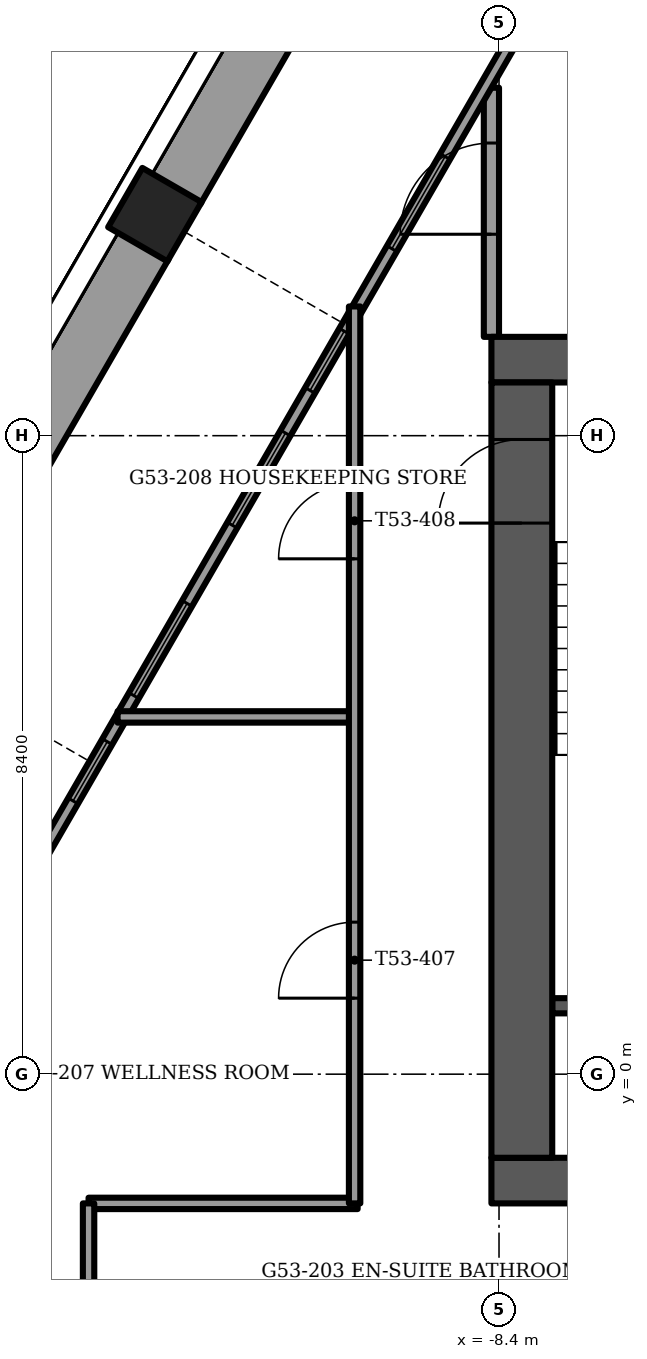
"""IFC4 building model, lengths in metres.
Left out: names, types, materials, properties, quantities, classifications, styles, units other than length and angle.
Written with IfcOpenShell. Run it as: python <this file> out.ifc"""

import sys

from ifc_helpers import new_model, si_unit, direction, frame, frame_2d, origin, origin_2d, place, context, subcontext, project, spatial, rectangle, extrude, element, fill, save


model = new_model("IFC4")
c1 = context("Model", 3, precision=1e-05, world=origin(), true_north=direction((0.0, 1.0)))
c2 = subcontext(c1, "Body", "Model", "MODEL_VIEW")
j1 = project(units=[si_unit("LENGTHUNIT", "METRE"), si_unit("PLANEANGLEUNIT", "RADIAN")], contexts=[c1])
p1 = place(None, origin())
s1 = spatial("IfcSite", under=j1, at=p1, CompositionType="ELEMENT")
p2 = place(p1, origin())
s2 = spatial("IfcBuilding", under=s1, at=p2, CompositionType="ELEMENT")
p3 = place(p2, frame((0.0, 0.0, 214.5)))
s3 = spatial("IfcBuildingStorey", under=s2, at=p3, CompositionType="ELEMENT", Elevation=214.5)
p4 = place(p3, frame((-12.928, 11.308, -1.2), z_axis=(0.0, 0.0, 1.0), x_axis=(0.5, 0.866025403784, 0.0)))
e1 = element("IfcColumn", 1, at=p4, inside=s3, PredefinedType="COLUMN", context=c2, shape_type="SweptSolid", body=[
    extrude(rectangle(XDim=0.9, YDim=0.9, at=origin_2d()), origin(), (0.0, 0.0, 1.0), 3.75),
])
p5 = place(p3, frame((-8.5, -1.4, -0.3), z_axis=(0.0, 0.0, 1.0), x_axis=(1.0, 0.0, 0.0)))
e2 = element("IfcWall", 2, at=p5, inside=s3, PredefinedType="SHEAR", context=c2, shape_type="SweptSolid", body=[
    extrude(rectangle(XDim=17.0, YDim=0.6, at=frame_2d((8.5, 0.0))), origin(), (0.0, 0.0, 1.0), 3.75),
])
p6 = place(p5, frame((7.7, 0.0, 0.0)))
e3 = element("IfcOpeningElement", 3, at=p6, cuts=e2, PredefinedType="OPENING", context=c2, shape_type="SweptSolid", body=[
    extrude(rectangle(XDim=1.6, YDim=2.1, at=frame_2d((0.8, 1.05))), frame((0.0, 0.3, 0.0), z_axis=(0.0, -1.0, 0.0), x_axis=(1.0, 0.0, 0.0)), (0.0, 0.0, 1.0), 0.6),
])
p7 = place(p3, frame((-8.5, 9.4, -0.3), z_axis=(0.0, 0.0, 1.0), x_axis=(1.0, 0.0, 0.0)))
e4 = element("IfcWall", 4, at=p7, inside=s3, PredefinedType="SHEAR", context=c2, shape_type="SweptSolid", body=[
    extrude(rectangle(XDim=17.0, YDim=0.6, at=frame_2d((8.5, 0.0))), origin(), (0.0, 0.0, 1.0), 3.75),
])
p8 = place(p7, frame((7.7, 0.0, 0.0)))
e5 = element("IfcOpeningElement", 5, at=p8, cuts=e4, PredefinedType="OPENING", context=c2, shape_type="SweptSolid", body=[
    extrude(rectangle(XDim=1.6, YDim=2.1, at=frame_2d((0.8, 1.05))), frame((0.0, 0.3, 0.0), z_axis=(0.0, -1.0, 0.0), x_axis=(1.0, 0.0, 0.0)), (0.0, 0.0, 1.0), 0.6),
])
p9 = place(p7, frame((1.75, 0.0, 0.0)))
e6 = element("IfcOpeningElement", 6, at=p9, cuts=e4, PredefinedType="OPENING", context=c2, shape_type="SweptSolid", body=[
    extrude(rectangle(XDim=1.1, YDim=2.1, at=frame_2d((0.55, 1.05))), frame((0.0, 0.3, 0.0), z_axis=(0.0, -1.0, 0.0), x_axis=(1.0, 0.0, 0.0)), (0.0, 0.0, 1.0), 0.6),
])
p10 = place(p7, frame((14.15, 0.0, 0.0)))
e7 = element("IfcOpeningElement", 7, at=p10, cuts=e4, PredefinedType="OPENING", context=c2, shape_type="SweptSolid", body=[
    extrude(rectangle(XDim=1.1, YDim=2.1, at=frame_2d((0.55, 1.05))), frame((0.0, 0.3, 0.0), z_axis=(0.0, -1.0, 0.0), x_axis=(1.0, 0.0, 0.0)), (0.0, 0.0, 1.0), 0.6),
])
p11 = place(p3, frame((-8.1, -1.1, -0.3), z_axis=(0.0, 0.0, 1.0), x_axis=(0.0, 1.0, 0.0)))
e8 = element("IfcWall", 8, at=p11, inside=s3, PredefinedType="SHEAR", context=c2, shape_type="SweptSolid", body=[
    extrude(rectangle(XDim=10.2, YDim=0.8, at=frame_2d((5.1, 0.0))), origin(), (0.0, 0.0, 1.0), 3.75),
])
p12 = place(p11, frame((8.35, 0.0, 0.0)))
e9 = element("IfcOpeningElement", 9, at=p12, cuts=e8, PredefinedType="OPENING", context=c2, shape_type="SweptSolid", body=[
    extrude(rectangle(XDim=1.1, YDim=2.1, at=frame_2d((0.55, 1.05))), frame((0.0, 0.4, 0.0), z_axis=(0.0, -1.0, 0.0), x_axis=(1.0, 0.0, 0.0)), (0.0, 0.0, 1.0), 0.8),
])
p13 = place(p3, frame((-9.972, 16.428, 0.0), z_axis=(0.0, 0.0, 1.0), x_axis=(-0.50000722722, -0.866021231107, 0.0)))
e10 = element("IfcWall", 10, at=p13, inside=s3, PredefinedType="PARAPET", context=c2, shape_type="SweptSolid", body=[
    extrude(rectangle(XDim=5.492, YDim=0.9, at=frame_2d((2.746, 0.0))), origin(), (0.0, 0.0, 1.0), 1.1),
])
p14 = place(p3, frame((-13.138, 10.945, 0.0), z_axis=(0.0, 0.0, 1.0), x_axis=(-0.500015433515, -0.866016493057, 0.0)))
e11 = element("IfcWall", 11, at=p14, inside=s3, PredefinedType="PARAPET", context=c2, shape_type="SweptSolid", body=[
    extrude(rectangle(XDim=5.819, YDim=0.9, at=frame_2d((2.909, 0.0))), origin(), (0.0, 0.0, 1.0), 1.1),
])
p15 = place(p3, frame((-6.961, 15.792, 0.0), z_axis=(0.0, 0.0, 1.0), x_axis=(-0.49999710518, -0.866027075103, 0.0)))
e12 = element("IfcWall", 12, at=p15, inside=s3, PredefinedType="SOLIDWALL", context=c2, shape_type="SweptSolid", body=[
    extrude(rectangle(XDim=17.621, YDim=0.15, at=frame_2d((8.81, 0.0))), origin(), (0.0, 0.0, 1.0), 3.45),
])
p16 = place(p15, frame((4.296, 0.0, 0.15)))
e13 = element("IfcOpeningElement", 13, at=p16, cuts=e12, PredefinedType="OPENING", context=c2, shape_type="SweptSolid", body=[
    extrude(rectangle(XDim=1.4, YDim=2.85, at=frame_2d((0.7, 1.425))), frame((0.0, 0.075, 0.0), z_axis=(0.0, -1.0, 0.0), x_axis=(1.0, 0.0, 0.0)), (0.0, 0.0, 1.0), 0.15),
])
p17 = place(p15, frame((6.949, 0.0, 0.15)))
e14 = element("IfcOpeningElement", 14, at=p17, cuts=e12, PredefinedType="OPENING", context=c2, shape_type="SweptSolid", body=[
    extrude(rectangle(XDim=0.9, YDim=2.85, at=frame_2d((0.45, 1.425))), frame((0.0, 0.075, 0.0), z_axis=(0.0, -1.0, 0.0), x_axis=(1.0, 0.0, 0.0)), (0.0, 0.0, 1.0), 0.15),
])
p18 = place(p15, frame((8.496, 0.0, 0.15)))
e15 = element("IfcOpeningElement", 15, at=p18, cuts=e12, PredefinedType="OPENING", context=c2, shape_type="SweptSolid", body=[
    extrude(rectangle(XDim=1.4, YDim=2.85, at=frame_2d((0.7, 1.425))), frame((0.0, 0.075, 0.0), z_axis=(0.0, -1.0, 0.0), x_axis=(1.0, 0.0, 0.0)), (0.0, 0.0, 1.0), 0.15),
])
p19 = place(p15, frame((13.185, 0.0, 0.15)))
e16 = element("IfcOpeningElement", 16, at=p19, cuts=e12, PredefinedType="OPENING", context=c2, shape_type="SweptSolid", body=[
    extrude(rectangle(XDim=0.9, YDim=2.85, at=frame_2d((0.45, 1.425))), frame((0.0, 0.075, 0.0), z_axis=(0.0, -1.0, 0.0), x_axis=(1.0, 0.0, 0.0)), (0.0, 0.0, 1.0), 0.15),
])
p20 = place(p15, frame((11.085, 0.0, 0.15)))
e17 = element("IfcOpeningElement", 17, at=p20, cuts=e12, PredefinedType="OPENING", context=c2, shape_type="SweptSolid", body=[
    extrude(rectangle(XDim=1.4, YDim=2.85, at=frame_2d((0.7, 1.425))), frame((0.0, 0.075, 0.0), z_axis=(0.0, -1.0, 0.0), x_axis=(1.0, 0.0, 0.0)), (0.0, 0.0, 1.0), 0.15),
])
p21 = place(p15, frame((0.398, 0.0, 0.15)))
e18 = element("IfcOpeningElement", 18, at=p21, cuts=e12, PredefinedType="OPENING", context=c2, shape_type="SweptSolid", body=[
    extrude(rectangle(XDim=0.9, YDim=2.73, at=frame_2d((0.45, 1.365))), frame((0.0, 0.075, 0.0), z_axis=(0.0, -1.0, 0.0), x_axis=(1.0, 0.0, 0.0)), (0.0, 0.0, 1.0), 0.15),
])
p22 = place(p15, frame((15.308, 0.0, 0.15)))
e19 = element("IfcOpeningElement", 19, at=p22, cuts=e12, PredefinedType="OPENING", context=c2, shape_type="SweptSolid", body=[
    extrude(rectangle(XDim=1.5, YDim=2.73, at=frame_2d((0.75, 1.365))), frame((0.0, 0.075, 0.0), z_axis=(0.0, -1.0, 0.0), x_axis=(1.0, 0.0, 0.0)), (0.0, 0.0, 1.0), 0.15),
])
p23 = place(p3, frame((-15.772, -0.532, 0.0), z_axis=(0.0, 0.0, 1.0), x_axis=(0.500000919504, -0.866024872908, 0.0)))
e20 = element("IfcWall", 20, at=p23, inside=s3, PredefinedType="SOLIDWALL", context=c2, shape_type="SweptSolid", body=[
    extrude(rectangle(XDim=14.85, YDim=0.15, at=frame_2d((7.425, 0.0))), origin(), (0.0, 0.0, 1.0), 3.45),
])
p24 = place(p23, frame((4.884, 0.0, 0.15)))
e21 = element("IfcOpeningElement", 21, at=p24, cuts=e20, PredefinedType="OPENING", context=c2, shape_type="SweptSolid", body=[
    extrude(rectangle(XDim=1.4, YDim=2.85, at=frame_2d((0.7, 1.425))), frame((0.0, 0.075, 0.0), z_axis=(0.0, -1.0, 0.0), x_axis=(1.0, 0.0, 0.0)), (0.0, 0.0, 1.0), 0.15),
])
p25 = place(p23, frame((7.725, 0.0, 0.15)))
e22 = element("IfcOpeningElement", 22, at=p25, cuts=e20, PredefinedType="OPENING", context=c2, shape_type="SweptSolid", body=[
    extrude(rectangle(XDim=1.5, YDim=2.85, at=frame_2d((0.75, 1.425))), frame((0.0, 0.075, 0.0), z_axis=(0.0, -1.0, 0.0), x_axis=(1.0, 0.0, 0.0)), (0.0, 0.0, 1.0), 0.15),
])
p26 = place(p23, frame((9.925, 0.0, 0.0)))
e23 = element("IfcOpeningElement", 23, at=p26, cuts=e20, PredefinedType="OPENING", context=c2, shape_type="SweptSolid", body=[
    extrude(rectangle(XDim=1.4, YDim=2.4, at=frame_2d((0.7, 1.2))), frame((0.0, 0.075, 0.0), z_axis=(0.0, -1.0, 0.0), x_axis=(1.0, 0.0, 0.0)), (0.0, 0.0, 1.0), 0.15),
])
p27 = place(p23, frame((0.812, 0.0, 0.15)))
e24 = element("IfcOpeningElement", 24, at=p27, cuts=e20, PredefinedType="OPENING", context=c2, shape_type="SweptSolid", body=[
    extrude(rectangle(XDim=1.5, YDim=2.73, at=frame_2d((0.75, 1.365))), frame((0.0, 0.075, 0.0), z_axis=(0.0, -1.0, 0.0), x_axis=(1.0, 0.0, 0.0)), (0.0, 0.0, 1.0), 0.15),
])
p28 = place(p23, frame((13.632, 0.0, 0.15)))
e25 = element("IfcOpeningElement", 25, at=p28, cuts=e20, PredefinedType="OPENING", context=c2, shape_type="SweptSolid", body=[
    extrude(rectangle(XDim=0.9, YDim=2.73, at=frame_2d((0.45, 1.365))), frame((0.0, 0.075, 0.0), z_axis=(0.0, -1.0, 0.0), x_axis=(1.0, 0.0, 0.0)), (0.0, 0.0, 1.0), 0.15),
])
p29 = place(p3, frame((-7.7, 0.9, -0.3), z_axis=(0.0, 0.0, 1.0), x_axis=(1.0, 0.0, 0.0)))
e26 = element("IfcWall", 26, at=p29, inside=s3, PredefinedType="SOLIDWALL", context=c2, shape_type="SweptSolid", body=[
    extrude(rectangle(XDim=3.25, YDim=0.2, at=frame_2d((1.625, 0.0))), origin(), (0.0, 0.0, 1.0), 3.75),
])
p30 = place(p3, frame((-8.5, 9.7, 0.0), z_axis=(0.0, 0.0, 1.0), x_axis=(0.0, 1.0, 0.0)))
e27 = element("IfcWall", 27, at=p30, inside=s3, PredefinedType="PARTITIONING", context=c2, shape_type="SweptSolid", body=[
    extrude(rectangle(XDim=3.278, YDim=0.2, at=frame_2d((1.639, 0.0))), origin(), (0.0, 0.0, 1.0), 3.45),
])
p31 = place(p30, frame((1.35, 0.0, 0.0)))
e28 = element("IfcOpeningElement", 28, at=p31, cuts=e27, PredefinedType="OPENING", context=c2, shape_type="SweptSolid", body=[
    extrude(rectangle(XDim=1.2, YDim=2.1, at=frame_2d((0.6, 1.05))), frame((0.0, 0.1, 0.0), z_axis=(0.0, -1.0, 0.0), x_axis=(1.0, 0.0, 0.0)), (0.0, 0.0, 1.0), 0.2),
])
p32 = place(p3, frame((-13.8, -1.7, 0.0), z_axis=(0.0, 0.0, 1.0), x_axis=(1.0, 0.0, 0.0)))
e29 = element("IfcWall", 29, at=p32, inside=s3, PredefinedType="PARTITIONING", context=c2, shape_type="SweptSolid", body=[
    extrude(rectangle(XDim=3.54, YDim=0.15, at=frame_2d((1.77, 0.0))), origin(), (0.0, 0.0, 1.0), 3.45),
])
p33 = place(p3, frame((-13.418, 4.7, 0.0), z_axis=(0.0, 0.0, 1.0), x_axis=(1.0, 0.0, 0.0)))
e30 = element("IfcWall", 30, at=p33, inside=s3, PredefinedType="PARTITIONING", context=c2, shape_type="SweptSolid", body=[
    extrude(rectangle(XDim=3.118, YDim=0.15, at=frame_2d((1.559, 0.0))), origin(), (0.0, 0.0, 1.0), 3.45),
])
p34 = place(p3, frame((-10.3, -1.7, 0.0), z_axis=(0.0, 0.0, 1.0), x_axis=(0.0, 1.0, 0.0)))
e31 = element("IfcWall", 31, at=p34, inside=s3, PredefinedType="PARTITIONING", context=c2, shape_type="SweptSolid", body=[
    extrude(rectangle(XDim=11.8, YDim=0.15, at=frame_2d((5.9, 0.0))), origin(), (0.0, 0.0, 1.0), 3.45),
])
p35 = place(p34, frame((2.7, 0.0, 0.0)))
e32 = element("IfcOpeningElement", 32, at=p35, cuts=e31, PredefinedType="OPENING", context=c2, shape_type="SweptSolid", body=[
    extrude(rectangle(XDim=1.0, YDim=2.1, at=frame_2d((0.5, 1.05))), frame((0.0, 0.075, 0.0), z_axis=(0.0, -1.0, 0.0), x_axis=(1.0, 0.0, 0.0)), (0.0, 0.0, 1.0), 0.15),
])
p36 = place(p34, frame((8.48, 0.0, 0.0)))
e33 = element("IfcOpeningElement", 33, at=p36, cuts=e31, PredefinedType="OPENING", context=c2, shape_type="SweptSolid", body=[
    extrude(rectangle(XDim=1.0, YDim=2.1, at=frame_2d((0.5, 1.05))), frame((0.0, 0.075, 0.0), z_axis=(0.0, -1.0, 0.0), x_axis=(1.0, 0.0, 0.0)), (0.0, 0.0, 1.0), 0.15),
])
p37 = place(p3, frame((-13.8, -4.038, 0.0), z_axis=(0.0, 0.0, 1.0), x_axis=(0.0, 1.0, 0.0)))
e34 = element("IfcWall", 34, at=p37, inside=s3, PredefinedType="PARTITIONING", context=c2, shape_type="SweptSolid", body=[
    extrude(rectangle(XDim=2.338, YDim=0.15, at=frame_2d((1.169, 0.0))), origin(), (0.0, 0.0, 1.0), 3.45),
])
p38 = place(p16, origin())
e35 = element("IfcWindow", 35, at=p38, inside=s3, PartitioningType="SINGLE_PANEL", PredefinedType="WINDOW", context=c2, shape_type="SweptSolid", body=[
    extrude(rectangle(XDim=1.4, YDim=2.85, at=frame_2d((0.7, 1.425))), frame((0.0, 0.03, 0.0), z_axis=(0.0, -1.0, 0.0), x_axis=(1.0, 0.0, 0.0)), (0.0, 0.0, 1.0), 0.06),
])
fill(e13, e35)
p39 = place(p17, origin())
e36 = element("IfcWindow", 36, at=p39, inside=s3, PartitioningType="SINGLE_PANEL", PredefinedType="WINDOW", context=c2, shape_type="SweptSolid", body=[
    extrude(rectangle(XDim=0.9, YDim=2.85, at=frame_2d((0.45, 1.425))), frame((0.0, 0.03, 0.0), z_axis=(0.0, -1.0, 0.0), x_axis=(1.0, 0.0, 0.0)), (0.0, 0.0, 1.0), 0.06),
])
fill(e14, e36)
p40 = place(p18, origin())
e37 = element("IfcWindow", 37, at=p40, inside=s3, PartitioningType="SINGLE_PANEL", PredefinedType="WINDOW", context=c2, shape_type="SweptSolid", body=[
    extrude(rectangle(XDim=1.4, YDim=2.85, at=frame_2d((0.7, 1.425))), frame((0.0, 0.03, 0.0), z_axis=(0.0, -1.0, 0.0), x_axis=(1.0, 0.0, 0.0)), (0.0, 0.0, 1.0), 0.06),
])
fill(e15, e37)
p41 = place(p19, origin())
e38 = element("IfcWindow", 38, at=p41, inside=s3, PartitioningType="SINGLE_PANEL", PredefinedType="WINDOW", context=c2, shape_type="SweptSolid", body=[
    extrude(rectangle(XDim=0.9, YDim=2.85, at=frame_2d((0.45, 1.425))), frame((0.0, 0.03, 0.0), z_axis=(0.0, -1.0, 0.0), x_axis=(1.0, 0.0, 0.0)), (0.0, 0.0, 1.0), 0.06),
])
fill(e16, e38)
p42 = place(p20, origin())
e39 = element("IfcWindow", 39, at=p42, inside=s3, PartitioningType="SINGLE_PANEL", PredefinedType="WINDOW", context=c2, shape_type="SweptSolid", body=[
    extrude(rectangle(XDim=1.4, YDim=2.85, at=frame_2d((0.7, 1.425))), frame((0.0, 0.03, 0.0), z_axis=(0.0, -1.0, 0.0), x_axis=(1.0, 0.0, 0.0)), (0.0, 0.0, 1.0), 0.06),
])
fill(e17, e39)
p43 = place(p12, origin())
e40 = element("IfcDoor", 40, at=p43, inside=s3, OperationType="SINGLE_SWING_RIGHT", PredefinedType="DOOR", context=c2, shape_type="SweptSolid", body=[
    extrude(rectangle(XDim=1.1, YDim=2.1, at=frame_2d((0.55, 1.05))), frame((0.0, 0.025, 0.0), z_axis=(0.0, -1.0, 0.0), x_axis=(1.0, 0.0, 0.0)), (0.0, 0.0, 1.0), 0.05),
])
fill(e9, e40)
p44 = place(p31, origin())
e41 = element("IfcDoor", 41, at=p44, inside=s3, OperationType="SINGLE_SWING_LEFT", PredefinedType="DOOR", context=c2, shape_type="SweptSolid", body=[
    extrude(rectangle(XDim=1.2, YDim=2.1, at=frame_2d((0.6, 1.05))), frame((0.0, 0.025, 0.0), z_axis=(0.0, -1.0, 0.0), x_axis=(1.0, 0.0, 0.0)), (0.0, 0.0, 1.0), 0.05),
])
fill(e28, e41)
p45 = place(p35, origin())
e42 = element("IfcDoor", 42, at=p45, inside=s3, OperationType="SINGLE_SWING_RIGHT", PredefinedType="DOOR", context=c2, shape_type="SweptSolid", body=[
    extrude(rectangle(XDim=1.0, YDim=2.1, at=frame_2d((0.5, 1.05))), frame((0.0, 0.025, 0.0), z_axis=(0.0, -1.0, 0.0), x_axis=(1.0, 0.0, 0.0)), (0.0, 0.0, 1.0), 0.05),
])
fill(e32, e42)
p46 = place(p36, origin())
e43 = element("IfcDoor", 43, at=p46, inside=s3, OperationType="SINGLE_SWING_LEFT", PredefinedType="DOOR", context=c2, shape_type="SweptSolid", body=[
    extrude(rectangle(XDim=1.0, YDim=2.1, at=frame_2d((0.5, 1.05))), frame((0.0, 0.025, 0.0), z_axis=(0.0, -1.0, 0.0), x_axis=(1.0, 0.0, 0.0)), (0.0, 0.0, 1.0), 0.05),
])
fill(e33, e43)
save(model, sys.argv[1])
